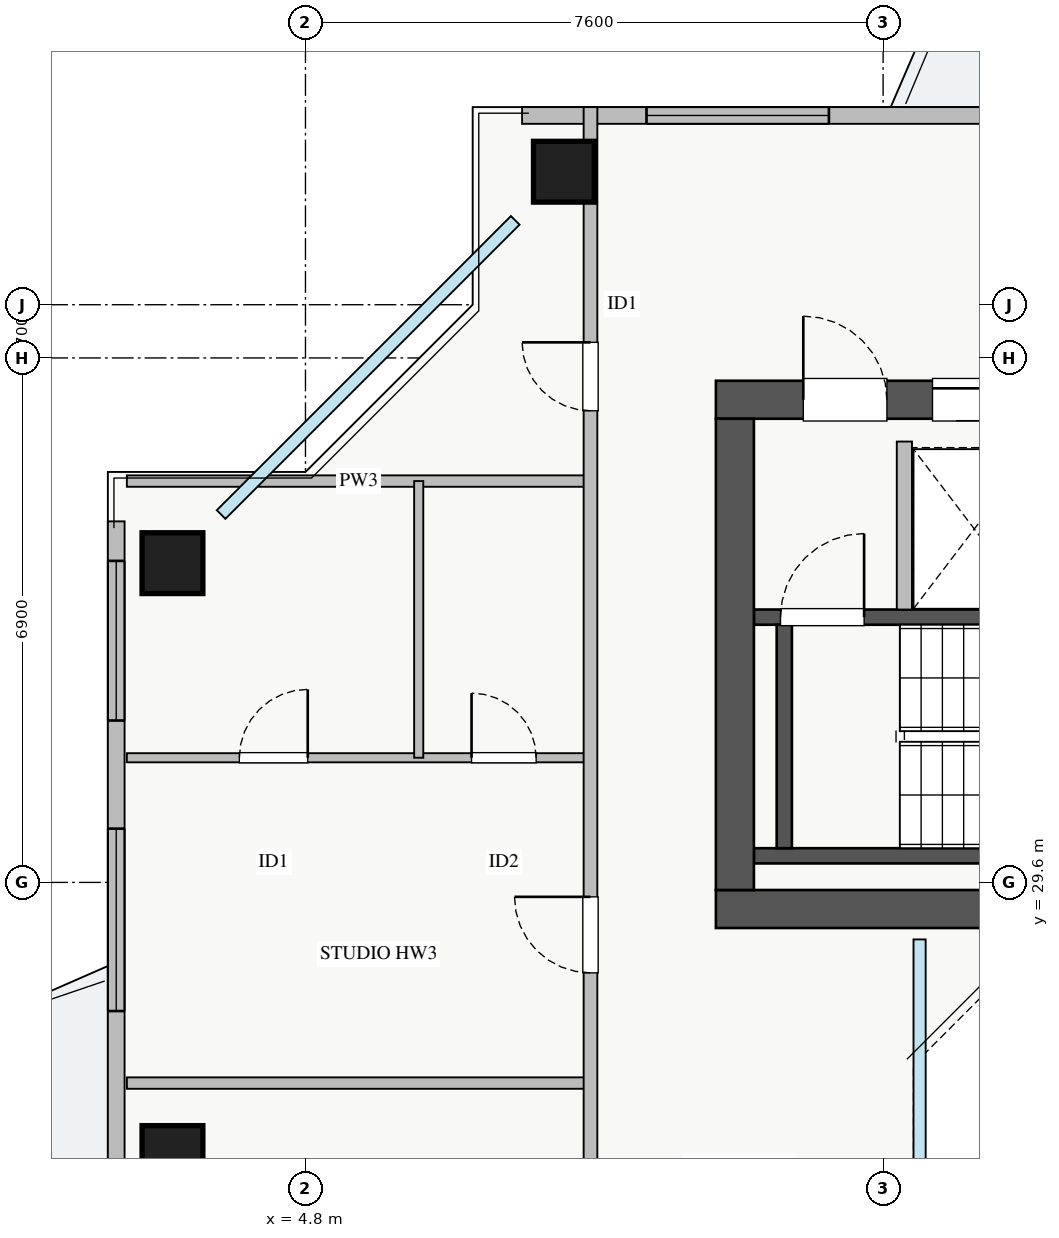
"""IFC4 building model, lengths in metres.
Left out: names, types, materials, properties, quantities, classifications, styles, units other than length and angle.
Written with IfcOpenShell. Run it as: python <this file> out.ifc"""

import sys

from ifc_helpers import new_model, si_unit, direction, frame, frame_2d, origin, origin_2d, place, context, subcontext, project, spatial, rectangle, extrude, source, transform, mapped, element, fill, save


model = new_model("IFC4")
c1 = context("Model", 3, precision=1e-05, world=origin(), true_north=direction((0.0, 1.0)))
c2 = subcontext(c1, "Body", "Model", "MODEL_VIEW")
j1 = project(units=[si_unit("LENGTHUNIT", "METRE"), si_unit("PLANEANGLEUNIT", "RADIAN")], contexts=[c1])
p1 = place(None, origin())
s1 = spatial("IfcSite", under=j1, at=p1, CompositionType="ELEMENT")
p2 = place(p1, origin())
s2 = spatial("IfcBuilding", under=s1, at=p2, CompositionType="ELEMENT")
p3 = place(p2, frame((0.0, 0.0, 203.5)))
s3 = spatial("IfcBuildingStorey", under=s2, at=p3, CompositionType="ELEMENT", Elevation=203.5)
p4 = place(p3, frame((12.68, 33.2, 0.0), z_axis=(0.0, 0.0, 1.0), x_axis=(1.0, 0.0, 0.0)))
e1 = element("IfcWall", 1, at=p4, inside=s3, PredefinedType="SHEAR", context=c2, shape_type="SweptSolid", body=[
    extrude(rectangle(XDim=1.94, YDim=0.18, at=frame_2d((0.97, 0.0))), origin(), (0.0, 0.0, 1.0), 3.07),
])
p5 = place(p3, frame((10.7, 29.95, 0.0), z_axis=(0.0, 0.0, 1.0), x_axis=(1.0, 0.0, 0.0)))
e2 = element("IfcWall", 2, at=p5, inside=s3, PredefinedType="SHEAR", context=c2, shape_type="SweptSolid", body=[
    extrude(rectangle(XDim=7.45, YDim=0.2, at=frame_2d((3.725, 0.0))), origin(), (0.0, 0.0, 1.0), 3.25),
])
p6 = place(p3, frame((10.7, 33.09, 0.0), z_axis=(0.0, 0.0, 1.0), x_axis=(1.0, 0.0, 0.0)))
e3 = element("IfcWall", 3, at=p6, inside=s3, PredefinedType="SHEAR", context=c2, shape_type="SweptSolid", body=[
    extrude(rectangle(XDim=7.45, YDim=0.2, at=frame_2d((3.725, 0.0))), origin(), (0.0, 0.0, 1.0), 3.25),
])
p7 = place(p6, frame((0.35, 0.0, 0.0)))
e4 = element("IfcOpeningElement", 4, at=p7, cuts=e3, PredefinedType="OPENING", context=c2, shape_type="SweptSolid", body=[
    extrude(rectangle(XDim=1.1, YDim=2.05, at=frame_2d((0.55, 1.025))), frame((0.0, 0.11, 0.0), z_axis=(0.0, -1.0, 0.0), x_axis=(1.0, 0.0, 0.0)), (0.0, 0.0, 1.0), 0.22),
])
p8 = place(p3, frame((11.1, 30.05, 0.0), z_axis=(0.0, 0.0, 1.0), x_axis=(0.0, 1.0, 0.0)))
e5 = element("IfcWall", 5, at=p8, inside=s3, PredefinedType="SHEAR", context=c2, shape_type="SweptSolid", body=[
    extrude(rectangle(XDim=2.94, YDim=0.2, at=frame_2d((1.47, 0.0))), origin(), (0.0, 0.0, 1.0), 3.25),
])
p9 = place(p3, frame((10.2, 29.25, 0.0), z_axis=(0.0, 0.0, 1.0), x_axis=(1.0, 0.0, 0.0)))
e6 = element("IfcWall", 6, at=p9, inside=s3, PredefinedType="SHEAR", context=c2, shape_type="SweptSolid", body=[
    extrude(rectangle(XDim=17.6, YDim=0.5, at=frame_2d((8.8, 0.0))), origin(), (0.0, 0.0, 1.0), 3.25),
])
p10 = place(p3, frame((10.2, 35.95, 0.0), z_axis=(0.0, 0.0, 1.0), x_axis=(1.0, 0.0, 0.0)))
e7 = element("IfcWall", 7, at=p10, inside=s3, PredefinedType="SHEAR", context=c2, shape_type="SweptSolid", body=[
    extrude(rectangle(XDim=17.6, YDim=0.5, at=frame_2d((8.8, 0.0))), origin(), (0.0, 0.0, 1.0), 3.25),
])
p11 = place(p10, frame((1.15, 0.0, 0.0)))
e8 = element("IfcOpeningElement", 8, at=p11, cuts=e7, PredefinedType="OPENING", context=c2, shape_type="SweptSolid", body=[
    extrude(rectangle(XDim=1.1, YDim=2.05, at=frame_2d((0.55, 1.025))), frame((0.0, 0.26, 0.0), z_axis=(0.0, -1.0, 0.0), x_axis=(1.0, 0.0, 0.0)), (0.0, 0.0, 1.0), 0.52),
])
p12 = place(p10, frame((8.3, 0.0, 0.0)))
e9 = element("IfcOpeningElement", 9, at=p12, cuts=e7, PredefinedType="OPENING", context=c2, shape_type="SweptSolid", body=[
    extrude(rectangle(XDim=1.1, YDim=2.05, at=frame_2d((0.55, 1.025))), frame((0.0, 0.26, 0.0), z_axis=(0.0, -1.0, 0.0), x_axis=(1.0, 0.0, 0.0)), (0.0, 0.0, 1.0), 0.52),
])
p13 = place(p10, frame((2.85, 0.0, 0.0)))
e10 = element("IfcOpeningElement", 10, at=p13, cuts=e7, PredefinedType="OPENING", context=c2, shape_type="SweptSolid", body=[
    extrude(rectangle(XDim=1.1, YDim=2.05, at=frame_2d((0.55, 1.025))), frame((0.0, 0.26, 0.0), z_axis=(0.0, -1.0, 0.0), x_axis=(1.0, 0.0, 0.0)), (0.0, 0.0, 1.0), 0.52),
])
p14 = place(p10, frame((5.8, 0.0, 0.0)))
e11 = element("IfcOpeningElement", 11, at=p14, cuts=e7, PredefinedType="OPENING", context=c2, shape_type="SweptSolid", body=[
    extrude(rectangle(XDim=1.0, YDim=2.05, at=frame_2d((0.5, 1.025))), frame((0.0, 0.26, 0.0), z_axis=(0.0, -1.0, 0.0), x_axis=(1.0, 0.0, 0.0)), (0.0, 0.0, 1.0), 0.52),
])
p15 = place(p10, frame((14.74, 0.0, 0.0)))
e12 = element("IfcOpeningElement", 12, at=p15, cuts=e7, PredefinedType="OPENING", context=c2, shape_type="SweptSolid", body=[
    extrude(rectangle(XDim=1.0, YDim=2.05, at=frame_2d((0.5, 1.025))), frame((0.0, 0.26, 0.0), z_axis=(0.0, -1.0, 0.0), x_axis=(1.0, 0.0, 0.0)), (0.0, 0.0, 1.0), 0.52),
])
p16 = place(p10, frame((10.005, 0.0, 0.0)))
e13 = element("IfcOpeningElement", 13, at=p16, cuts=e7, PredefinedType="OPENING", context=c2, shape_type="SweptSolid", body=[
    extrude(rectangle(XDim=1.0, YDim=2.05, at=frame_2d((0.5, 1.025))), frame((0.0, 0.26, 0.0), z_axis=(0.0, -1.0, 0.0), x_axis=(1.0, 0.0, 0.0)), (0.0, 0.0, 1.0), 0.52),
])
p17 = place(p10, frame((11.55, 0.0, 0.0)))
e14 = element("IfcOpeningElement", 14, at=p17, cuts=e7, PredefinedType="OPENING", context=c2, shape_type="SweptSolid", body=[
    extrude(rectangle(XDim=1.0, YDim=2.05, at=frame_2d((0.5, 1.025))), frame((0.0, 0.26, 0.0), z_axis=(0.0, -1.0, 0.0), x_axis=(1.0, 0.0, 0.0)), (0.0, 0.0, 1.0), 0.52),
])
p18 = place(p10, frame((13.215, 0.0, 0.0)))
e15 = element("IfcOpeningElement", 15, at=p18, cuts=e7, PredefinedType="OPENING", context=c2, shape_type="SweptSolid", body=[
    extrude(rectangle(XDim=1.0, YDim=2.05, at=frame_2d((0.5, 1.025))), frame((0.0, 0.26, 0.0), z_axis=(0.0, -1.0, 0.0), x_axis=(1.0, 0.0, 0.0)), (0.0, 0.0, 1.0), 0.52),
])
p19 = place(p3, frame((10.45, 29.5, 0.0), z_axis=(0.0, 0.0, 1.0), x_axis=(0.0, 1.0, 0.0)))
e16 = element("IfcWall", 16, at=p19, inside=s3, PredefinedType="SHEAR", context=c2, shape_type="SweptSolid", body=[
    extrude(rectangle(XDim=6.2, YDim=0.5, at=frame_2d((3.1, 0.0))), origin(), (0.0, 0.0, 1.0), 3.25),
])
m1 = source(origin(), c2, "Body", "SweptSolid", [
    extrude(rectangle(XDim=0.8, YDim=0.8, at=origin_2d()), origin(), (0.0, 0.0, 1.0), 3.25),
])
for number, where, z_axis, x_axis in (
    (17, (8.2, 38.95, 0.0), (0.0, 0.0, 1.0), (1.0, 0.0, 0.0)),
    (18, (3.05, 33.8, 0.0), (0.0, 0.0, 1.0), (1.0, 0.0, 0.0)),
    (19, (3.05, 26.0, 0.0), (0.0, 0.0, 1.0), (1.0, 0.0, 0.0)),
):
    element("IfcColumn", number, at=place(p3, frame(where, z_axis=z_axis, x_axis=x_axis)), inside=s3, PredefinedType="COLUMN", context=c2, shape_type="MappedRepresentation", body=[
        mapped(m1, transform((0.0, 0.0, 0.0), x_axis=(1.0, 0.0, 0.0), y_axis=(0.0, 1.0, 0.0), z_axis=(0.0, 0.0, 1.0), scale=1.0)),
    ])
p20 = place(p3, frame((7.65, 39.69, 0.0), z_axis=(0.0, 0.0, 1.0), x_axis=(1.0, 0.0, 0.0)))
e20 = element("IfcWall", 20, at=p20, inside=s3, PredefinedType="STANDARD", context=c2, shape_type="SweptSolid", body=[
    extrude(rectangle(XDim=22.7, YDim=0.22, at=frame_2d((11.35, 0.0))), origin(), (0.0, 0.0, 1.0), 2.61),
])
p21 = place(p20, frame((12.2, 0.0, 0.0)))
e21 = element("IfcOpeningElement", 21, at=p21, cuts=e20, PredefinedType="OPENING", context=c2, shape_type="SweptSolid", body=[
    extrude(rectangle(XDim=1.2, YDim=2.1, at=frame_2d((0.6, 1.05))), frame((0.0, 0.12, 0.0), z_axis=(0.0, -1.0, 0.0), x_axis=(1.0, 0.0, 0.0)), (0.0, 0.0, 1.0), 0.24),
])
p22 = place(p20, frame((1.637, 0.0, 0.9)))
e22 = element("IfcOpeningElement", 22, at=p22, cuts=e20, PredefinedType="OPENING", context=c2, shape_type="SweptSolid", body=[
    extrude(rectangle(XDim=2.4, YDim=1.48, at=frame_2d((1.2, 0.74))), frame((0.0, 0.12, 0.0), z_axis=(0.0, -1.0, 0.0), x_axis=(1.0, 0.0, 0.0)), (0.0, 0.0, 1.0), 0.24),
])
p23 = place(p20, frame((7.612, 0.0, 0.9)))
e23 = element("IfcOpeningElement", 23, at=p23, cuts=e20, PredefinedType="OPENING", context=c2, shape_type="SweptSolid", body=[
    extrude(rectangle(XDim=1.8, YDim=1.45, at=frame_2d((0.9, 0.725))), frame((0.0, 0.12, 0.0), z_axis=(0.0, -1.0, 0.0), x_axis=(1.0, 0.0, 0.0)), (0.0, 0.0, 1.0), 0.24),
])
p24 = place(p20, frame((18.812, 0.0, 0.9)))
e24 = element("IfcOpeningElement", 24, at=p24, cuts=e20, PredefinedType="OPENING", context=c2, shape_type="SweptSolid", body=[
    extrude(rectangle(XDim=2.1, YDim=1.48, at=frame_2d((1.05, 0.74))), frame((0.0, 0.12, 0.0), z_axis=(0.0, -1.0, 0.0), x_axis=(1.0, 0.0, 0.0)), (0.0, 0.0, 1.0), 0.24),
])
p25 = place(p3, frame((2.31, 11.65, 0.0), z_axis=(0.0, 0.0, 1.0), x_axis=(0.0, 1.0, 0.0)))
e25 = element("IfcWall", 25, at=p25, inside=s3, PredefinedType="STANDARD", context=c2, shape_type="SweptSolid", body=[
    extrude(rectangle(XDim=22.7, YDim=0.22, at=frame_2d((11.35, 0.0))), origin(), (0.0, 0.0, 1.0), 2.61),
])
p26 = place(p25, frame((12.2, 0.0, 0.0)))
e26 = element("IfcOpeningElement", 26, at=p26, cuts=e25, PredefinedType="OPENING", context=c2, shape_type="SweptSolid", body=[
    extrude(rectangle(XDim=1.2, YDim=2.1, at=frame_2d((0.6, 1.05))), frame((0.0, 0.12, 0.0), z_axis=(0.0, -1.0, 0.0), x_axis=(1.0, 0.0, 0.0)), (0.0, 0.0, 1.0), 0.24),
])
p27 = place(p25, frame((0.8, 0.0, 0.9)))
e27 = element("IfcOpeningElement", 27, at=p27, cuts=e25, PredefinedType="OPENING", context=c2, shape_type="SweptSolid", body=[
    extrude(rectangle(XDim=2.4, YDim=1.5, at=frame_2d((1.2, 0.75))), frame((0.0, 0.12, 0.0), z_axis=(0.0, -1.0, 0.0), x_axis=(1.0, 0.0, 0.0)), (0.0, 0.0, 1.0), 0.24),
])
p28 = place(p25, frame((20.08, 0.0, 0.9)))
e28 = element("IfcOpeningElement", 28, at=p28, cuts=e25, PredefinedType="OPENING", context=c2, shape_type="SweptSolid", body=[
    extrude(rectangle(XDim=2.1, YDim=1.5, at=frame_2d((1.05, 0.75))), frame((0.0, 0.12, 0.0), z_axis=(0.0, -1.0, 0.0), x_axis=(1.0, 0.0, 0.0)), (0.0, 0.0, 1.0), 0.24),
])
p29 = place(p25, frame((16.258, 0.0, 0.9)))
e29 = element("IfcOpeningElement", 29, at=p29, cuts=e25, PredefinedType="OPENING", context=c2, shape_type="SweptSolid", body=[
    extrude(rectangle(XDim=2.4, YDim=1.5, at=frame_2d((1.2, 0.75))), frame((0.0, 0.12, 0.0), z_axis=(0.0, -1.0, 0.0), x_axis=(1.0, 0.0, 0.0)), (0.0, 0.0, 1.0), 0.24),
])
p30 = place(p3, frame((12.68, 33.19, 0.0), z_axis=(0.0, 0.0, 1.0), x_axis=(0.0, 1.0, 0.0)))
e30 = element("IfcWall", 30, at=p30, inside=s3, PredefinedType="PARTITIONING", context=c2, shape_type="SweptSolid", body=[
    extrude(rectangle(XDim=2.21, YDim=0.2, at=frame_2d((1.105, 0.0))), origin(), (0.0, 0.0, 1.0), 3.07),
])
p31 = place(p3, frame((2.45, 34.88, 0.0), z_axis=(0.0, 0.0, 1.0), x_axis=(1.0, 0.0, 0.0)))
e31 = element("IfcWall", 31, at=p31, inside=s3, PredefinedType="PARTITIONING", context=c2, shape_type="SweptSolid", body=[
    extrude(rectangle(XDim=6.1, YDim=0.15, at=frame_2d((3.05, 0.0))), origin(), (0.0, 0.0, 1.0), 3.07),
])
p32 = place(p3, frame((2.45, 31.24, 0.0), z_axis=(0.0, 0.0, 1.0), x_axis=(1.0, 0.0, 0.0)))
e32 = element("IfcWall", 32, at=p32, inside=s3, PredefinedType="PLUMBINGWALL", context=c2, shape_type="SweptSolid", body=[
    extrude(rectangle(XDim=6.1, YDim=0.12, at=frame_2d((3.05, 0.0))), origin(), (0.0, 0.0, 1.0), 3.07),
])
p33 = place(p32, frame((1.48, 0.0, 0.0)))
e33 = element("IfcOpeningElement", 33, at=p33, cuts=e32, PredefinedType="OPENING", context=c2, shape_type="SweptSolid", body=[
    extrude(rectangle(XDim=0.9, YDim=2.05, at=frame_2d((0.45, 1.025))), frame((0.0, 0.07, 0.0), z_axis=(0.0, -1.0, 0.0), x_axis=(1.0, 0.0, 0.0)), (0.0, 0.0, 1.0), 0.14),
])
p34 = place(p32, frame((4.535, 0.0, 0.0)))
e34 = element("IfcOpeningElement", 34, at=p34, cuts=e32, PredefinedType="OPENING", context=c2, shape_type="SweptSolid", body=[
    extrude(rectangle(XDim=0.85, YDim=2.05, at=frame_2d((0.425, 1.025))), frame((0.0, 0.07, 0.0), z_axis=(0.0, -1.0, 0.0), x_axis=(1.0, 0.0, 0.0)), (0.0, 0.0, 1.0), 0.14),
])
p35 = place(p3, frame((6.29, 31.24, 0.0), z_axis=(0.0, 0.0, 1.0), x_axis=(0.0, 1.0, 0.0)))
e35 = element("IfcWall", 35, at=p35, inside=s3, PredefinedType="PLUMBINGWALL", context=c2, shape_type="SweptSolid", body=[
    extrude(rectangle(XDim=3.64, YDim=0.12, at=frame_2d((1.82, 0.0))), origin(), (0.0, 0.0, 1.0), 3.07),
])
p36 = place(p3, frame((2.45, 26.96, 0.0), z_axis=(0.0, 0.0, 1.0), x_axis=(1.0, 0.0, 0.0)))
e36 = element("IfcWall", 36, at=p36, inside=s3, PredefinedType="PARTITIONING", context=c2, shape_type="SweptSolid", body=[
    extrude(rectangle(XDim=6.1, YDim=0.15, at=frame_2d((3.05, 0.0))), origin(), (0.0, 0.0, 1.0), 3.07),
])
p37 = place(p3, frame((8.55, 6.2, 0.0), z_axis=(0.0, 0.0, 1.0), x_axis=(0.0, 1.0, 0.0)))
e37 = element("IfcWall", 37, at=p37, inside=s3, PredefinedType="PARTITIONING", context=c2, shape_type="SweptSolid", body=[
    extrude(rectangle(XDim=33.6, YDim=0.18, at=frame_2d((16.8, 0.0))), origin(), (0.0, 0.0, 1.0), 3.07),
])
p38 = place(p37, frame((29.605, 0.0, 0.0)))
e38 = element("IfcOpeningElement", 38, at=p38, cuts=e37, PredefinedType="OPENING", context=c2, shape_type="SweptSolid", body=[
    extrude(rectangle(XDim=0.9, YDim=2.05, at=frame_2d((0.45, 1.025))), frame((0.0, 0.1, 0.0), z_axis=(0.0, -1.0, 0.0), x_axis=(1.0, 0.0, 0.0)), (0.0, 0.0, 1.0), 0.2),
])
p39 = place(p37, frame((2.92, 0.0, 0.0)))
e39 = element("IfcOpeningElement", 39, at=p39, cuts=e37, PredefinedType="OPENING", context=c2, shape_type="SweptSolid", body=[
    extrude(rectangle(XDim=0.9, YDim=2.05, at=frame_2d((0.45, 1.025))), frame((0.0, 0.1, 0.0), z_axis=(0.0, -1.0, 0.0), x_axis=(1.0, 0.0, 0.0)), (0.0, 0.0, 1.0), 0.2),
])
p40 = place(p37, frame((6.48, 0.0, 0.0)))
e40 = element("IfcOpeningElement", 40, at=p40, cuts=e37, PredefinedType="OPENING", context=c2, shape_type="SweptSolid", body=[
    extrude(rectangle(XDim=1.0, YDim=2.05, at=frame_2d((0.5, 1.025))), frame((0.0, 0.1, 0.0), z_axis=(0.0, -1.0, 0.0), x_axis=(1.0, 0.0, 0.0)), (0.0, 0.0, 1.0), 0.2),
])
p41 = place(p37, frame((16.51, 0.0, 0.0)))
e41 = element("IfcOpeningElement", 41, at=p41, cuts=e37, PredefinedType="OPENING", context=c2, shape_type="SweptSolid", body=[
    extrude(rectangle(XDim=1.0, YDim=2.05, at=frame_2d((0.5, 1.025))), frame((0.0, 0.1, 0.0), z_axis=(0.0, -1.0, 0.0), x_axis=(1.0, 0.0, 0.0)), (0.0, 0.0, 1.0), 0.2),
])
p42 = place(p37, frame((22.21, 0.0, 0.0)))
e42 = element("IfcOpeningElement", 42, at=p42, cuts=e37, PredefinedType="OPENING", context=c2, shape_type="SweptSolid", body=[
    extrude(rectangle(XDim=1.0, YDim=2.05, at=frame_2d((0.5, 1.025))), frame((0.0, 0.1, 0.0), z_axis=(0.0, -1.0, 0.0), x_axis=(1.0, 0.0, 0.0)), (0.0, 0.0, 1.0), 0.2),
])
m2 = source(origin(), c2, "Body", "SweptSolid", [
    extrude(rectangle(XDim=2.4, YDim=1.48, at=frame_2d((1.2, 0.74))), frame((0.0, 0.03, 0.0), z_axis=(0.0, -1.0, 0.0), x_axis=(1.0, 0.0, 0.0)), (0.0, 0.0, 1.0), 0.06),
])
p43 = place(p22, origin())
e43 = element("IfcWindow", 43, at=p43, inside=s3, PartitioningType="TRIPLE_PANEL_VERTICAL", PredefinedType="WINDOW", context=c2, shape_type="MappedRepresentation", body=[
    mapped(m2, transform((0.0, 0.0, 0.0), x_axis=(1.0, 0.0, 0.0), y_axis=(0.0, 1.0, 0.0), z_axis=(0.0, 0.0, 1.0), scale=1.0)),
])
fill(e22, e43)
m3 = source(origin(), c2, "Body", "SweptSolid", [
    extrude(rectangle(XDim=2.1, YDim=1.5, at=frame_2d((1.05, 0.75))), frame((0.0, 0.03, 0.0), z_axis=(0.0, -1.0, 0.0), x_axis=(1.0, 0.0, 0.0)), (0.0, 0.0, 1.0), 0.06),
])
p44 = place(p28, origin())
e44 = element("IfcWindow", 44, at=p44, inside=s3, PartitioningType="TRIPLE_PANEL_VERTICAL", PredefinedType="WINDOW", context=c2, shape_type="MappedRepresentation", body=[
    mapped(m3, transform((0.0, 0.0, 0.0), x_axis=(1.0, 0.0, 0.0), y_axis=(0.0, 1.0, 0.0), z_axis=(0.0, 0.0, 1.0), scale=1.0)),
])
fill(e28, e44)
m4 = source(origin(), c2, "Body", "SweptSolid", [
    extrude(rectangle(XDim=1.1, YDim=2.05, at=frame_2d((0.55, 1.025))), frame((0.0, 0.025, 0.0), z_axis=(0.0, -1.0, 0.0), x_axis=(1.0, 0.0, 0.0)), (0.0, 0.0, 1.0), 0.05),
])
p45 = place(p11, origin())
e45 = element("IfcDoor", 45, at=p45, inside=s3, OperationType="SINGLE_SWING_LEFT", PredefinedType="DOOR", context=c2, shape_type="MappedRepresentation", body=[
    mapped(m4, transform((0.0, 0.0, 0.0), x_axis=(1.0, 0.0, 0.0), y_axis=(0.0, 1.0, 0.0), z_axis=(0.0, 0.0, 1.0), scale=1.0)),
])
fill(e8, e45)
p46 = place(p7, origin())
e46 = element("IfcDoor", 46, at=p46, inside=s3, OperationType="SINGLE_SWING_RIGHT", PredefinedType="DOOR", context=c2, shape_type="MappedRepresentation", body=[
    mapped(m4, transform((0.0, 0.0, 0.0), x_axis=(1.0, 0.0, 0.0), y_axis=(0.0, 1.0, 0.0), z_axis=(0.0, 0.0, 1.0), scale=1.0)),
])
fill(e4, e46)
p47 = place(p13, origin())
e47 = element("IfcDoor", 47, at=p47, inside=s3, OperationType="SLIDING_TO_LEFT", PredefinedType="DOOR", context=c2, shape_type="MappedRepresentation", body=[
    mapped(m4, transform((0.0, 0.0, 0.0), x_axis=(1.0, 0.0, 0.0), y_axis=(0.0, 1.0, 0.0), z_axis=(0.0, 0.0, 1.0), scale=1.0)),
])
fill(e10, e47)
m5 = source(origin(), c2, "Body", "SweptSolid", [
    extrude(rectangle(XDim=0.9, YDim=2.05, at=frame_2d((0.45, 1.025))), frame((0.0, 0.025, 0.0), z_axis=(0.0, -1.0, 0.0), x_axis=(1.0, 0.0, 0.0)), (0.0, 0.0, 1.0), 0.05),
])
p48 = place(p33, origin())
e48 = element("IfcDoor", 48, at=p48, inside=s3, OperationType="SINGLE_SWING_RIGHT", PredefinedType="DOOR", context=c2, shape_type="MappedRepresentation", body=[
    mapped(m5, transform((0.0, 0.0, 0.0), x_axis=(1.0, 0.0, 0.0), y_axis=(0.0, 1.0, 0.0), z_axis=(0.0, 0.0, 1.0), scale=1.0)),
])
fill(e33, e48)
m6 = source(origin(), c2, "Body", "SweptSolid", [
    extrude(rectangle(XDim=0.85, YDim=2.05, at=frame_2d((0.425, 1.025))), frame((0.0, 0.025, 0.0), z_axis=(0.0, -1.0, 0.0), x_axis=(1.0, 0.0, 0.0)), (0.0, 0.0, 1.0), 0.05),
])
p49 = place(p34, origin())
e49 = element("IfcDoor", 49, at=p49, inside=s3, OperationType="SINGLE_SWING_LEFT", PredefinedType="DOOR", context=c2, shape_type="MappedRepresentation", body=[
    mapped(m6, transform((0.0, 0.0, 0.0), x_axis=(1.0, 0.0, 0.0), y_axis=(0.0, 1.0, 0.0), z_axis=(0.0, 0.0, 1.0), scale=1.0)),
])
fill(e34, e49)
p50 = place(p38, origin())
e50 = element("IfcDoor", 50, at=p50, inside=s3, OperationType="SINGLE_SWING_RIGHT", PredefinedType="DOOR", context=c2, shape_type="MappedRepresentation", body=[
    mapped(m5, transform((0.0, 0.0, 0.0), x_axis=(1.0, 0.0, 0.0), y_axis=(0.0, 1.0, 0.0), z_axis=(0.0, 0.0, 1.0), scale=1.0)),
])
fill(e38, e50)
m7 = source(origin(), c2, "Body", "SweptSolid", [
    extrude(rectangle(XDim=1.0, YDim=2.05, at=frame_2d((0.5, 1.025))), frame((0.0, 0.025, 0.0), z_axis=(0.0, -1.0, 0.0), x_axis=(1.0, 0.0, 0.0)), (0.0, 0.0, 1.0), 0.05),
])
p51 = place(p42, origin())
e51 = element("IfcDoor", 51, at=p51, inside=s3, OperationType="SINGLE_SWING_RIGHT", PredefinedType="DOOR", context=c2, shape_type="MappedRepresentation", body=[
    mapped(m7, transform((0.0, 0.0, 0.0), x_axis=(1.0, 0.0, 0.0), y_axis=(0.0, 1.0, 0.0), z_axis=(0.0, 0.0, 1.0), scale=1.0)),
])
fill(e42, e51)
m8 = source(origin(), c2, "Body", "SweptSolid", [
    extrude(rectangle(XDim=2.4, YDim=1.5, at=frame_2d((1.2, 0.75))), frame((0.0, 0.03, 0.0), z_axis=(0.0, -1.0, 0.0), x_axis=(1.0, 0.0, 0.0)), (0.0, 0.0, 1.0), 0.06),
])
p52 = place(p29, origin())
e52 = element("IfcWindow", 52, at=p52, inside=s3, PartitioningType="TRIPLE_PANEL_VERTICAL", PredefinedType="WINDOW", context=c2, shape_type="MappedRepresentation", body=[
    mapped(m8, transform((0.0, 0.0, 0.0), x_axis=(1.0, 0.0, 0.0), y_axis=(0.0, 1.0, 0.0), z_axis=(0.0, 0.0, 1.0), scale=1.0)),
])
fill(e29, e52)
save(model, sys.argv[1])
